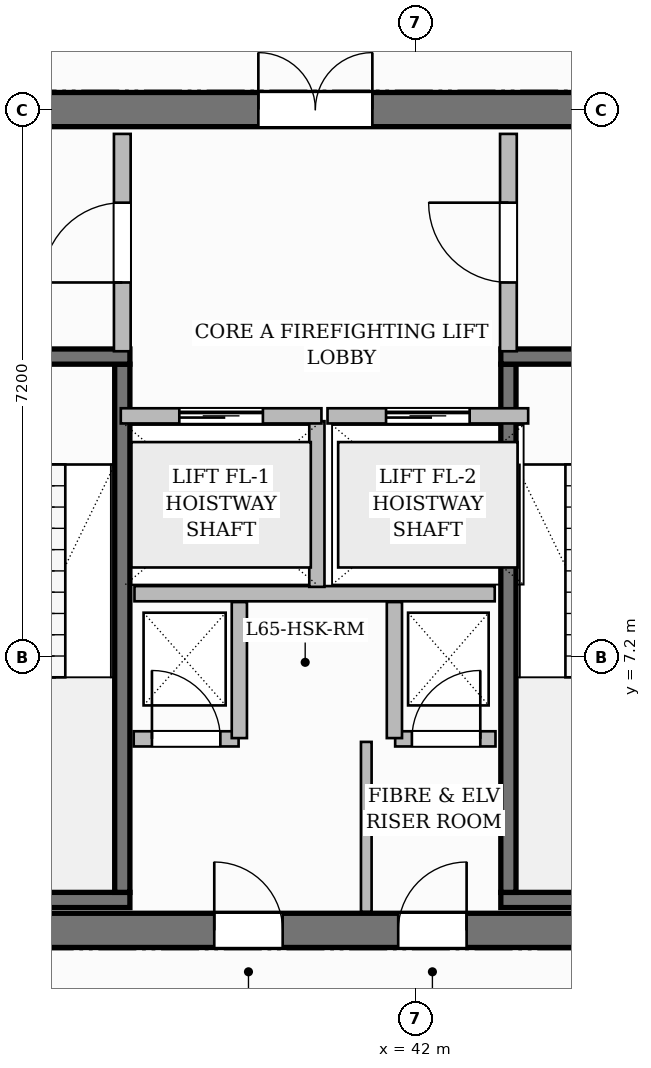
"""IFC4 building model, lengths in metres.
Left out: names, types, materials, properties, quantities, classifications, styles, units other than length and angle.
Written with IfcOpenShell. Run it as: python <this file> out.ifc"""

import sys

from ifc_helpers import new_model, si_unit, direction, frame, frame_2d, origin, place, context, subcontext, project, spatial, rectangle, extrude, source, transform, mapped, element, fill, save


model = new_model("IFC4")
c1 = context("Model", 3, precision=1e-05, world=origin(), true_north=direction((0.0, 1.0)))
c2 = subcontext(c1, "Body", "Model", "MODEL_VIEW")
j1 = project(units=[si_unit("LENGTHUNIT", "METRE"), si_unit("PLANEANGLEUNIT", "RADIAN")], contexts=[c1])
p1 = place(None, origin())
s1 = spatial("IfcSite", under=j1, at=p1, CompositionType="ELEMENT")
p2 = place(p1, origin())
s2 = spatial("IfcBuilding", under=s1, at=p2, CompositionType="ELEMENT")
p3 = place(p2, frame((0.0, 0.0, 259.65)))
s3 = spatial("IfcBuildingStorey", under=s2, at=p3, CompositionType="ELEMENT", Elevation=259.65)
p4 = place(p3, frame((34.575, 3.6, 0.0), z_axis=(0.0, 0.0, 1.0), x_axis=(1.0, 0.0, 0.0)))
e1 = element("IfcWall", 1, at=p4, inside=s3, PredefinedType="SHEAR", context=c2, shape_type="SweptSolid", body=[
    extrude(rectangle(XDim=15.45, YDim=0.45, at=frame_2d((7.725, 0.0))), origin(), (0.0, 0.0, 1.0), 3.85),
])
p5 = place(p4, frame((4.775, 0.0, 0.0)))
e2 = element("IfcOpeningElement", 2, at=p5, cuts=e1, PredefinedType="OPENING", context=c2, shape_type="SweptSolid", body=[
    extrude(rectangle(XDim=0.9, YDim=2.1, at=frame_2d((0.45, 1.05))), frame((0.0, 0.235, 0.0), z_axis=(0.0, -1.0, 0.0), x_axis=(1.0, 0.0, 0.0)), (0.0, 0.0, 1.0), 0.47),
])
p6 = place(p4, frame((7.195, 0.0, 0.0)))
e3 = element("IfcOpeningElement", 3, at=p6, cuts=e1, PredefinedType="OPENING", context=c2, shape_type="SweptSolid", body=[
    extrude(rectangle(XDim=0.9, YDim=2.1, at=frame_2d((0.45, 1.05))), frame((0.0, 0.235, 0.0), z_axis=(0.0, -1.0, 0.0), x_axis=(1.0, 0.0, 0.0)), (0.0, 0.0, 1.0), 0.47),
])
p7 = place(p3, frame((34.575, 14.4, 0.0), z_axis=(0.0, 0.0, 1.0), x_axis=(1.0, 0.0, 0.0)))
e4 = element("IfcWall", 4, at=p7, inside=s3, PredefinedType="SHEAR", context=c2, shape_type="SweptSolid", body=[
    extrude(rectangle(XDim=15.45, YDim=0.45, at=frame_2d((7.725, 0.0))), origin(), (0.0, 0.0, 1.0), 3.85),
])
p8 = place(p7, frame((5.355, 0.0, 0.0)))
e5 = element("IfcOpeningElement", 5, at=p8, cuts=e4, PredefinedType="OPENING", context=c2, shape_type="SweptSolid", body=[
    extrude(rectangle(XDim=1.5, YDim=2.2, at=frame_2d((0.75, 1.1))), frame((0.0, 0.235, 0.0), z_axis=(0.0, -1.0, 0.0), x_axis=(1.0, 0.0, 0.0)), (0.0, 0.0, 1.0), 0.47),
])
p9 = place(p7, frame((1.57, 0.0, 0.0)))
e6 = element("IfcOpeningElement", 6, at=p9, cuts=e4, PredefinedType="OPENING", context=c2, shape_type="SweptSolid", body=[
    extrude(rectangle(XDim=1.05, YDim=2.15, at=frame_2d((0.525, 1.075))), frame((0.0, 0.235, 0.0), z_axis=(0.0, -1.0, 0.0), x_axis=(1.0, 0.0, 0.0)), (0.0, 0.0, 1.0), 0.47),
])
p10 = place(p7, frame((11.2, 0.0, 0.0)))
e7 = element("IfcOpeningElement", 7, at=p10, cuts=e4, PredefinedType="OPENING", context=c2, shape_type="SweptSolid", body=[
    extrude(rectangle(XDim=1.05, YDim=2.15, at=frame_2d((0.525, 1.075))), frame((0.0, 0.235, 0.0), z_axis=(0.0, -1.0, 0.0), x_axis=(1.0, 0.0, 0.0)), (0.0, 0.0, 1.0), 0.47),
])
p11 = place(p3, frame((35.025, 4.0, 0.0), z_axis=(0.0, 0.0, 1.0), x_axis=(1.0, 0.0, 0.0)))
e8 = element("IfcWall", 8, at=p11, inside=s3, PredefinedType="SHEAR", context=c2, shape_type="SweptSolid", body=[
    extrude(rectangle(XDim=3.215, YDim=0.2, at=frame_2d((1.607, 0.0))), origin(), (0.0, 0.0, 1.0), 3.85),
])
p12 = place(p3, frame((38.14, 4.1, 0.0), z_axis=(0.0, 0.0, 1.0), x_axis=(0.0, 1.0, 0.0)))
e9 = element("IfcWall", 9, at=p12, inside=s3, PredefinedType="SHEAR", context=c2, shape_type="SweptSolid", body=[
    extrude(rectangle(XDim=6.95, YDim=0.2, at=frame_2d((3.475, 0.0))), origin(), (0.0, 0.0, 1.0), 3.85),
])
p13 = place(p3, frame((35.025, 11.15, 0.0), z_axis=(0.0, 0.0, 1.0), x_axis=(1.0, 0.0, 0.0)))
e10 = element("IfcWall", 10, at=p13, inside=s3, PredefinedType="SHEAR", context=c2, shape_type="SweptSolid", body=[
    extrude(rectangle(XDim=3.215, YDim=0.2, at=frame_2d((1.607, 0.0))), origin(), (0.0, 0.0, 1.0), 3.85),
])
p14 = place(p13, frame((1.12, 0.0, 0.0)))
e11 = element("IfcOpeningElement", 11, at=p14, cuts=e10, PredefinedType="OPENING", context=c2, shape_type="SweptSolid", body=[
    extrude(rectangle(XDim=1.05, YDim=2.2, at=frame_2d((0.525, 1.1))), frame((0.0, 0.11, 0.0), z_axis=(0.0, -1.0, 0.0), x_axis=(1.0, 0.0, 0.0)), (0.0, 0.0, 1.0), 0.22),
])
p15 = place(p3, frame((43.12, 4.0, 0.0), z_axis=(0.0, 0.0, 1.0), x_axis=(1.0, 0.0, 0.0)))
e12 = element("IfcWall", 12, at=p15, inside=s3, PredefinedType="SHEAR", context=c2, shape_type="SweptSolid", body=[
    extrude(rectangle(XDim=6.455, YDim=0.2, at=frame_2d((3.228, 0.0))), origin(), (0.0, 0.0, 1.0), 3.85),
])
p16 = place(p3, frame((43.22, 4.1, 0.0), z_axis=(0.0, 0.0, 1.0), x_axis=(0.0, 1.0, 0.0)))
e13 = element("IfcWall", 13, at=p16, inside=s3, PredefinedType="SHEAR", context=c2, shape_type="SweptSolid", body=[
    extrude(rectangle(XDim=6.95, YDim=0.2, at=frame_2d((3.475, 0.0))), origin(), (0.0, 0.0, 1.0), 3.85),
])
p17 = place(p3, frame((43.12, 11.15, 0.0), z_axis=(0.0, 0.0, 1.0), x_axis=(1.0, 0.0, 0.0)))
e14 = element("IfcWall", 14, at=p17, inside=s3, PredefinedType="SHEAR", context=c2, shape_type="SweptSolid", body=[
    extrude(rectangle(XDim=6.455, YDim=0.2, at=frame_2d((3.228, 0.0))), origin(), (0.0, 0.0, 1.0), 3.85),
])
p18 = place(p17, frame((1.045, 0.0, 0.0)))
e15 = element("IfcOpeningElement", 15, at=p18, cuts=e14, PredefinedType="OPENING", context=c2, shape_type="SweptSolid", body=[
    extrude(rectangle(XDim=1.05, YDim=2.2, at=frame_2d((0.525, 1.1))), frame((0.0, 0.11, 0.0), z_axis=(0.0, -1.0, 0.0), x_axis=(1.0, 0.0, 0.0)), (0.0, 0.0, 1.0), 0.22),
])
p19 = place(p17, frame((4.125, 0.0, 0.0)))
e16 = element("IfcOpeningElement", 16, at=p19, cuts=e14, PredefinedType="OPENING", context=c2, shape_type="SweptSolid", body=[
    extrude(rectangle(XDim=1.05, YDim=2.2, at=frame_2d((0.525, 1.1))), frame((0.0, 0.11, 0.0), z_axis=(0.0, -1.0, 0.0), x_axis=(1.0, 0.0, 0.0)), (0.0, 0.0, 1.0), 0.22),
])
p20 = place(p3, frame((38.3, 8.03, 0.0), z_axis=(0.0, 0.0, 1.0), x_axis=(1.0, 0.0, 0.0)))
e17 = element("IfcWall", 17, at=p20, inside=s3, PredefinedType="PARTITIONING", context=c2, shape_type="SweptSolid", body=[
    extrude(rectangle(XDim=4.74, YDim=0.2, at=frame_2d((2.37, 0.0))), origin(), (0.0, 0.0, 1.0), 3.6),
])
p21 = place(p3, frame((40.7, 8.12, 0.0), z_axis=(0.0, 0.0, 1.0), x_axis=(0.0, 1.0, 0.0)))
e18 = element("IfcWall", 18, at=p21, inside=s3, PredefinedType="PARTITIONING", context=c2, shape_type="SweptSolid", body=[
    extrude(rectangle(XDim=2.18, YDim=0.2, at=frame_2d((1.09, 0.0))), origin(), (0.0, 0.0, 1.0), 3.6),
])
p22 = place(p3, frame((38.14, 11.22, 0.0), z_axis=(0.0, 0.0, 1.0), x_axis=(0.0, 1.0, 0.0)))
e19 = element("IfcWall", 19, at=p22, inside=s3, PredefinedType="PARTITIONING", context=c2, shape_type="SweptSolid", body=[
    extrude(rectangle(XDim=2.86, YDim=0.22, at=frame_2d((1.43, 0.0))), origin(), (0.0, 0.0, 1.0), 3.6),
])
p23 = place(p22, frame((0.905, 0.0, 0.0)))
e20 = element("IfcOpeningElement", 20, at=p23, cuts=e19, PredefinedType="OPENING", context=c2, shape_type="SweptSolid", body=[
    extrude(rectangle(XDim=1.05, YDim=2.15, at=frame_2d((0.525, 1.075))), frame((0.0, 0.12, 0.0), z_axis=(0.0, -1.0, 0.0), x_axis=(1.0, 0.0, 0.0)), (0.0, 0.0, 1.0), 0.24),
])
p24 = place(p3, frame((43.22, 11.22, 0.0), z_axis=(0.0, 0.0, 1.0), x_axis=(0.0, 1.0, 0.0)))
e21 = element("IfcWall", 21, at=p24, inside=s3, PredefinedType="PARTITIONING", context=c2, shape_type="SweptSolid", body=[
    extrude(rectangle(XDim=2.86, YDim=0.22, at=frame_2d((1.43, 0.0))), origin(), (0.0, 0.0, 1.0), 3.6),
])
p25 = place(p24, frame((0.905, 0.0, 0.0)))
e22 = element("IfcOpeningElement", 22, at=p25, cuts=e21, PredefinedType="OPENING", context=c2, shape_type="SweptSolid", body=[
    extrude(rectangle(XDim=1.05, YDim=2.15, at=frame_2d((0.525, 1.075))), frame((0.0, 0.12, 0.0), z_axis=(0.0, -1.0, 0.0), x_axis=(1.0, 0.0, 0.0)), (0.0, 0.0, 1.0), 0.24),
])
p26 = place(p3, frame((38.29, 6.12, 0.0), z_axis=(0.0, 0.0, 1.0), x_axis=(1.0, 0.0, 0.0)))
e23 = element("IfcWall", 23, at=p26, inside=s3, PredefinedType="PARTITIONING", context=c2, shape_type="SweptSolid", body=[
    extrude(rectangle(XDim=1.38, YDim=0.2, at=frame_2d((0.69, 0.0))), origin(), (0.0, 0.0, 1.0), 3.6),
])
p27 = place(p26, frame((0.24, 0.0, 0.0)))
e24 = element("IfcOpeningElement", 24, at=p27, cuts=e23, PredefinedType="OPENING", context=c2, shape_type="SweptSolid", body=[
    extrude(rectangle(XDim=0.9, YDim=2.1, at=frame_2d((0.45, 1.05))), frame((0.0, 0.11, 0.0), z_axis=(0.0, -1.0, 0.0), x_axis=(1.0, 0.0, 0.0)), (0.0, 0.0, 1.0), 0.22),
])
p28 = place(p3, frame((39.68, 6.13, 0.0), z_axis=(0.0, 0.0, 1.0), x_axis=(0.0, 1.0, 0.0)))
e25 = element("IfcWall", 25, at=p28, inside=s3, PredefinedType="PARTITIONING", context=c2, shape_type="SweptSolid", body=[
    extrude(rectangle(XDim=1.79, YDim=0.2, at=frame_2d((0.895, 0.0))), origin(), (0.0, 0.0, 1.0), 3.6),
])
p29 = place(p3, frame((41.73, 6.12, 0.0), z_axis=(0.0, 0.0, 1.0), x_axis=(1.0, 0.0, 0.0)))
e26 = element("IfcWall", 26, at=p29, inside=s3, PredefinedType="PARTITIONING", context=c2, shape_type="SweptSolid", body=[
    extrude(rectangle(XDim=1.32, YDim=0.2, at=frame_2d((0.66, 0.0))), origin(), (0.0, 0.0, 1.0), 3.6),
])
p30 = place(p29, frame((0.22, 0.0, 0.0)))
e27 = element("IfcOpeningElement", 27, at=p30, cuts=e26, PredefinedType="OPENING", context=c2, shape_type="SweptSolid", body=[
    extrude(rectangle(XDim=0.9, YDim=2.1, at=frame_2d((0.45, 1.05))), frame((0.0, 0.11, 0.0), z_axis=(0.0, -1.0, 0.0), x_axis=(1.0, 0.0, 0.0)), (0.0, 0.0, 1.0), 0.22),
])
p31 = place(p3, frame((41.72, 6.13, 0.0), z_axis=(0.0, 0.0, 1.0), x_axis=(0.0, 1.0, 0.0)))
e28 = element("IfcWall", 28, at=p31, inside=s3, PredefinedType="PARTITIONING", context=c2, shape_type="SweptSolid", body=[
    extrude(rectangle(XDim=1.79, YDim=0.2, at=frame_2d((0.895, 0.0))), origin(), (0.0, 0.0, 1.0), 3.6),
])
p32 = place(p3, frame((41.35, 3.845, 0.0), z_axis=(0.0, 0.0, 1.0), x_axis=(0.0, 1.0, 0.0)))
e29 = element("IfcWall", 29, at=p32, inside=s3, PredefinedType="PARTITIONING", context=c2, shape_type="SweptSolid", body=[
    extrude(rectangle(XDim=2.235, YDim=0.14, at=frame_2d((1.118, 0.0))), origin(), (0.0, 0.0, 1.0), 3.6),
])
p33 = place(p3, frame((38.12, 10.37, 0.0), z_axis=(0.0, 0.0, 1.0), x_axis=(1.0, 0.0, 0.0)))
e30 = element("IfcWall", 30, at=p33, inside=s3, PredefinedType="PARTITIONING", context=c2, shape_type="SweptSolid", body=[
    extrude(rectangle(XDim=2.64, YDim=0.2, at=frame_2d((1.32, 0.0))), origin(), (0.0, 0.0, 1.0), 3.6),
])
p34 = place(p33, frame((0.77, 0.0, 0.0)))
e31 = element("IfcOpeningElement", 31, at=p34, cuts=e30, PredefinedType="OPENING", context=c2, shape_type="SweptSolid", body=[
    extrude(rectangle(XDim=1.1, YDim=2.2, at=frame_2d((0.55, 1.1))), frame((0.0, 0.11, 0.0), z_axis=(0.0, -1.0, 0.0), x_axis=(1.0, 0.0, 0.0)), (0.0, 0.0, 1.0), 0.22),
])
p35 = place(p3, frame((40.84, 10.37, 0.0), z_axis=(0.0, 0.0, 1.0), x_axis=(1.0, 0.0, 0.0)))
e32 = element("IfcWall", 32, at=p35, inside=s3, PredefinedType="PARTITIONING", context=c2, shape_type="SweptSolid", body=[
    extrude(rectangle(XDim=2.64, YDim=0.2, at=frame_2d((1.32, 0.0))), origin(), (0.0, 0.0, 1.0), 3.6),
])
p36 = place(p35, frame((0.77, 0.0, 0.0)))
e33 = element("IfcOpeningElement", 33, at=p36, cuts=e32, PredefinedType="OPENING", context=c2, shape_type="SweptSolid", body=[
    extrude(rectangle(XDim=1.1, YDim=2.2, at=frame_2d((0.55, 1.1))), frame((0.0, 0.11, 0.0), z_axis=(0.0, -1.0, 0.0), x_axis=(1.0, 0.0, 0.0)), (0.0, 0.0, 1.0), 0.22),
])
m1 = source(origin(), c2, "Body", "SweptSolid", [
    extrude(rectangle(XDim=1.05, YDim=2.15, at=frame_2d((0.525, 1.075))), frame((0.0, 0.025, 0.0), z_axis=(0.0, -1.0, 0.0), x_axis=(1.0, 0.0, 0.0)), (0.0, 0.0, 1.0), 0.05),
])
p37 = place(p23, origin())
e34 = element("IfcDoor", 34, at=p37, inside=s3, OperationType="SINGLE_SWING_LEFT", PredefinedType="DOOR", context=c2, shape_type="MappedRepresentation", body=[
    mapped(m1, transform((0.0, 0.0, 0.0), scale=1.0)),
])
fill(e20, e34)
p38 = place(p25, origin())
e35 = element("IfcDoor", 35, at=p38, inside=s3, OperationType="SINGLE_SWING_RIGHT", PredefinedType="DOOR", context=c2, shape_type="MappedRepresentation", body=[
    mapped(m1, transform((0.0, 0.0, 0.0), scale=1.0)),
])
fill(e22, e35)
m2 = source(origin(), c2, "Body", "SweptSolid", [
    extrude(rectangle(XDim=1.5, YDim=2.2, at=frame_2d((0.75, 1.1))), frame((0.0, 0.025, 0.0), z_axis=(0.0, -1.0, 0.0), x_axis=(1.0, 0.0, 0.0)), (0.0, 0.0, 1.0), 0.05),
])
p39 = place(p8, origin())
e36 = element("IfcDoor", 36, at=p39, inside=s3, OperationType="DOUBLE_DOOR_SINGLE_SWING", PredefinedType="DOOR", context=c2, shape_type="MappedRepresentation", body=[
    mapped(m2, transform((0.0, 0.0, 0.0), scale=1.0)),
])
fill(e5, e36)
m3 = source(origin(), c2, "Body", "SweptSolid", [
    extrude(rectangle(XDim=0.9, YDim=2.1, at=frame_2d((0.45, 1.05))), frame((0.0, 0.025, 0.0), z_axis=(0.0, -1.0, 0.0), x_axis=(1.0, 0.0, 0.0)), (0.0, 0.0, 1.0), 0.05),
])
p40 = place(p27, origin())
e37 = element("IfcDoor", 37, at=p40, inside=s3, OperationType="SINGLE_SWING_LEFT", PredefinedType="DOOR", context=c2, shape_type="MappedRepresentation", body=[
    mapped(m3, transform((0.0, 0.0, 0.0), scale=1.0)),
])
fill(e24, e37)
p41 = place(p30, origin())
e38 = element("IfcDoor", 38, at=p41, inside=s3, OperationType="SINGLE_SWING_RIGHT", PredefinedType="DOOR", context=c2, shape_type="MappedRepresentation", body=[
    mapped(m3, transform((0.0, 0.0, 0.0), scale=1.0)),
])
fill(e27, e38)
p42 = place(p5, origin())
e39 = element("IfcDoor", 39, at=p42, inside=s3, OperationType="SINGLE_SWING_LEFT", PredefinedType="DOOR", context=c2, shape_type="MappedRepresentation", body=[
    mapped(m3, transform((0.0, 0.0, 0.0), scale=1.0)),
])
fill(e2, e39)
p43 = place(p6, origin())
e40 = element("IfcDoor", 40, at=p43, inside=s3, OperationType="SINGLE_SWING_RIGHT", PredefinedType="DOOR", context=c2, shape_type="MappedRepresentation", body=[
    mapped(m3, transform((0.0, 0.0, 0.0), scale=1.0)),
])
fill(e3, e40)
m4 = source(origin(), c2, "Body", "SweptSolid", [
    extrude(rectangle(XDim=1.1, YDim=2.2, at=frame_2d((0.55, 1.1))), frame((0.0, 0.025, 0.0), z_axis=(0.0, -1.0, 0.0), x_axis=(1.0, 0.0, 0.0)), (0.0, 0.0, 1.0), 0.05),
])
p44 = place(p34, origin())
e41 = element("IfcDoor", 41, at=p44, inside=s3, OperationType="SLIDING_TO_LEFT", PredefinedType="DOOR", context=c2, shape_type="MappedRepresentation", body=[
    mapped(m4, transform((0.0, 0.0, 0.0), scale=1.0)),
])
fill(e31, e41)
p45 = place(p36, origin())
e42 = element("IfcDoor", 42, at=p45, inside=s3, OperationType="SLIDING_TO_LEFT", PredefinedType="DOOR", context=c2, shape_type="MappedRepresentation", body=[
    mapped(m4, transform((0.0, 0.0, 0.0), scale=1.0)),
])
fill(e33, e42)
save(model, sys.argv[1])
